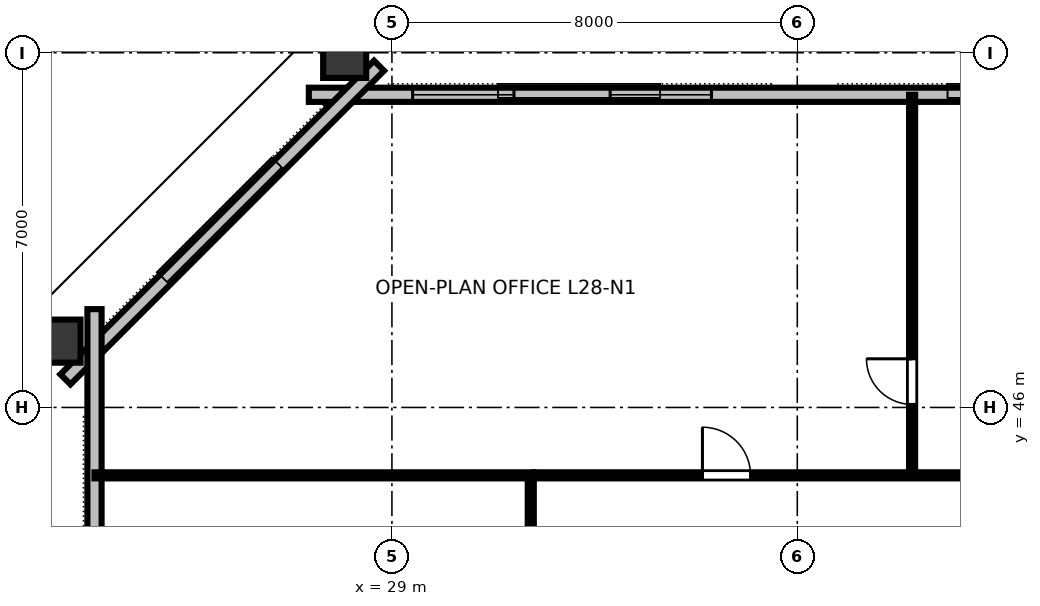
"""IFC4 building model, lengths in metres.
Left out: names, types, materials, properties, quantities, classifications, styles, units other than length and angle.
Written with IfcOpenShell. Run it as: python <this file> out.ifc"""

import sys

from ifc_helpers import new_model, si_unit, direction, frame, frame_2d, origin, origin_2d, place, context, subcontext, project, spatial, rectangle, hollow_rectangle, extrude, element, fill, save


model = new_model("IFC4")
c1 = context("Model", 3, precision=1e-05, world=origin(), true_north=direction((0.0, 1.0)))
c2 = subcontext(c1, "Body", "Model", "MODEL_VIEW")
j1 = project(units=[si_unit("LENGTHUNIT", "METRE"), si_unit("PLANEANGLEUNIT", "RADIAN")], contexts=[c1])
p1 = place(None, origin())
s1 = spatial("IfcSite", under=j1, at=p1, CompositionType="ELEMENT")
p2 = place(p1, origin())
s2 = spatial("IfcBuilding", under=s1, at=p2, CompositionType="ELEMENT")
p3 = place(p2, frame((0.0, 0.0, 109.6)))
s3 = spatial("IfcBuildingStorey", under=s2, at=p3, CompositionType="ELEMENT", Elevation=109.6)
for number, where, z_axis, x_axis in (
    (1, (28.067, 53.002, 0.0), (0.0, 0.0, 1.0), (1.0, 0.0, 0.0)),
    (2, (22.354, 47.309, 0.0), (0.0, 0.0, 1.0), (0.0, 1.0, 0.0)),
):
    element("IfcColumn", number, at=place(p3, frame(where, z_axis=z_axis, x_axis=x_axis)), inside=s3, PredefinedType="COLUMN", context=c2, shape_type="SweptSolid", body=[
        extrude(hollow_rectangle(XDim=0.85, YDim=1.0, WallThickness=0.05, at=origin_2d()), origin(), (0.0, 0.0, 1.0), 3.358),
    ])
p4 = place(p3, frame((64.64, 52.17, 0.0), z_axis=(0.0, 0.0, 1.0), x_axis=(-1.0, 0.0, 0.0)))
e3 = element("IfcWall", 3, at=p4, inside=s3, PredefinedType="STANDARD", context=c2, shape_type="SweptSolid", body=[
    extrude(rectangle(XDim=37.28, YDim=0.28, at=frame_2d((18.64, 0.0))), origin(), (0.0, 0.0, 1.0), 3.36),
])
p5 = place(p4, frame((15.347, 0.0, 0.0)))
e4 = element("IfcOpeningElement", 4, at=p5, cuts=e3, PredefinedType="OPENING", context=c2, shape_type="SweptSolid", body=[
    extrude(rectangle(XDim=1.4, YDim=2.15, at=frame_2d((0.7, 1.075))), frame((0.0, 0.15, 0.0), z_axis=(0.0, -1.0, 0.0), x_axis=(1.0, 0.0, 0.0)), (0.0, 0.0, 1.0), 0.3),
])
p6 = place(p4, frame((2.049, 0.0, 0.8)))
e5 = element("IfcOpeningElement", 5, at=p6, cuts=e3, PredefinedType="OPENING", context=c2, shape_type="SweptSolid", body=[
    extrude(rectangle(XDim=2.0, YDim=1.95, at=frame_2d((1.0, 0.975))), frame((0.0, 0.15, 0.0), z_axis=(0.0, -1.0, 0.0), x_axis=(1.0, 0.0, 0.0)), (0.0, 0.0, 1.0), 0.3),
])
p7 = place(p4, frame((5.947, 0.0, 0.8)))
e6 = element("IfcOpeningElement", 6, at=p7, cuts=e3, PredefinedType="OPENING", context=c2, shape_type="SweptSolid", body=[
    extrude(rectangle(XDim=2.0, YDim=1.95, at=frame_2d((1.0, 0.975))), frame((0.0, 0.15, 0.0), z_axis=(0.0, -1.0, 0.0), x_axis=(1.0, 0.0, 0.0)), (0.0, 0.0, 1.0), 0.3),
])
p8 = place(p4, frame((29.333, 0.0, 0.8)))
e7 = element("IfcOpeningElement", 7, at=p8, cuts=e3, PredefinedType="OPENING", context=c2, shape_type="SweptSolid", body=[
    extrude(rectangle(XDim=2.0, YDim=1.95, at=frame_2d((1.0, 0.975))), frame((0.0, 0.15, 0.0), z_axis=(0.0, -1.0, 0.0), x_axis=(1.0, 0.0, 0.0)), (0.0, 0.0, 1.0), 0.3),
])
p9 = place(p4, frame((33.231, 0.0, 0.8)))
e8 = element("IfcOpeningElement", 8, at=p9, cuts=e3, PredefinedType="OPENING", context=c2, shape_type="SweptSolid", body=[
    extrude(rectangle(XDim=2.0, YDim=1.95, at=frame_2d((1.0, 0.975))), frame((0.0, 0.15, 0.0), z_axis=(0.0, -1.0, 0.0), x_axis=(1.0, 0.0, 0.0)), (0.0, 0.0, 1.0), 0.3),
])
p10 = place(p3, frame((28.746, 52.744, 0.0), z_axis=(0.0, 0.0, 1.0), x_axis=(-0.707106781187, -0.707106781187, 0.0)))
e9 = element("IfcWall", 9, at=p10, inside=s3, PredefinedType="STANDARD", context=c2, shape_type="SweptSolid", body=[
    extrude(rectangle(XDim=8.753, YDim=0.28, at=frame_2d((4.376, 0.0))), origin(), (0.0, 0.0, 1.0), 3.36),
])
p11 = place(p3, frame((23.13, 47.94, 0.0), z_axis=(0.0, 0.0, 1.0), x_axis=(0.0, -1.0, 0.0)))
e10 = element("IfcWall", 10, at=p11, inside=s3, PredefinedType="STANDARD", context=c2, shape_type="SweptSolid", body=[
    extrude(rectangle(XDim=31.88, YDim=0.28, at=frame_2d((15.94, 0.0))), origin(), (0.0, 0.0, 1.0), 3.36),
])
p12 = place(p11, frame((5.665, 0.0, 0.8)))
e11 = element("IfcOpeningElement", 11, at=p12, cuts=e10, PredefinedType="OPENING", context=c2, shape_type="SweptSolid", body=[
    extrude(rectangle(XDim=2.0, YDim=1.95, at=frame_2d((1.0, 0.975))), frame((0.0, 0.15, 0.0), z_axis=(0.0, -1.0, 0.0), x_axis=(1.0, 0.0, 0.0)), (0.0, 0.0, 1.0), 0.3),
])
p13 = place(p11, frame((9.375, 0.0, 0.8)))
e12 = element("IfcOpeningElement", 12, at=p13, cuts=e10, PredefinedType="OPENING", context=c2, shape_type="SweptSolid", body=[
    extrude(rectangle(XDim=2.0, YDim=1.95, at=frame_2d((1.0, 0.975))), frame((0.0, 0.15, 0.0), z_axis=(0.0, -1.0, 0.0), x_axis=(1.0, 0.0, 0.0)), (0.0, 0.0, 1.0), 0.3),
])
p14 = place(p11, frame((20.505, 0.0, 0.8)))
e13 = element("IfcOpeningElement", 13, at=p14, cuts=e10, PredefinedType="OPENING", context=c2, shape_type="SweptSolid", body=[
    extrude(rectangle(XDim=2.0, YDim=1.95, at=frame_2d((1.0, 0.975))), frame((0.0, 0.15, 0.0), z_axis=(0.0, -1.0, 0.0), x_axis=(1.0, 0.0, 0.0)), (0.0, 0.0, 1.0), 0.3),
])
p15 = place(p11, frame((24.215, 0.0, 0.8)))
e14 = element("IfcOpeningElement", 14, at=p15, cuts=e10, PredefinedType="OPENING", context=c2, shape_type="SweptSolid", body=[
    extrude(rectangle(XDim=2.0, YDim=1.95, at=frame_2d((1.0, 0.975))), frame((0.0, 0.15, 0.0), z_axis=(0.0, -1.0, 0.0), x_axis=(1.0, 0.0, 0.0)), (0.0, 0.0, 1.0), 0.3),
])
p16 = place(p3, frame((39.266, 44.66, 0.0), z_axis=(0.0, 0.0, 1.0), x_axis=(0.0, 1.0, 0.0)))
e15 = element("IfcWall", 15, at=p16, inside=s3, PredefinedType="PARTITIONING", context=c2, shape_type="SweptSolid", body=[
    extrude(rectangle(XDim=7.51, YDim=0.12, at=frame_2d((3.755, 0.0))), origin(), (0.0, 0.0, 1.0), 2.64),
])
p17 = place(p16, frame((1.4, 0.0, 0.0)))
e16 = element("IfcOpeningElement", 16, at=p17, cuts=e15, PredefinedType="OPENING", context=c2, shape_type="SweptSolid", body=[
    extrude(rectangle(XDim=0.9, YDim=2.15, at=frame_2d((0.45, 1.075))), frame((0.0, 0.07, 0.0), z_axis=(0.0, -1.0, 0.0), x_axis=(1.0, 0.0, 0.0)), (0.0, 0.0, 1.0), 0.14),
])
p18 = place(p3, frame((31.8, 44.66, 0.0), z_axis=(0.0, 0.0, 1.0), x_axis=(1.0, 0.0, 0.0)))
e17 = element("IfcWall", 17, at=p18, inside=s3, PredefinedType="PARTITIONING", context=c2, shape_type="SweptSolid", body=[
    extrude(rectangle(XDim=28.4, YDim=0.12, at=frame_2d((14.2, 0.0))), origin(), (0.0, 0.0, 1.0), 2.64),
])
p19 = place(p18, frame((3.328, 0.0, 0.0)))
e18 = element("IfcOpeningElement", 18, at=p19, cuts=e17, PredefinedType="OPENING", context=c2, shape_type="SweptSolid", body=[
    extrude(rectangle(XDim=0.95, YDim=2.15, at=frame_2d((0.475, 1.075))), frame((0.0, 0.07, 0.0), z_axis=(0.0, -1.0, 0.0), x_axis=(1.0, 0.0, 0.0)), (0.0, 0.0, 1.0), 0.14),
])
p20 = place(p18, frame((8.901, 0.0, 0.0)))
e19 = element("IfcOpeningElement", 19, at=p20, cuts=e17, PredefinedType="OPENING", context=c2, shape_type="SweptSolid", body=[
    extrude(rectangle(XDim=0.95, YDim=2.15, at=frame_2d((0.475, 1.075))), frame((0.0, 0.07, 0.0), z_axis=(0.0, -1.0, 0.0), x_axis=(1.0, 0.0, 0.0)), (0.0, 0.0, 1.0), 0.14),
])
p21 = place(p18, frame((14.127, 0.0, 0.0)))
e20 = element("IfcOpeningElement", 20, at=p21, cuts=e17, PredefinedType="OPENING", context=c2, shape_type="SweptSolid", body=[
    extrude(rectangle(XDim=0.95, YDim=2.15, at=frame_2d((0.475, 1.075))), frame((0.0, 0.07, 0.0), z_axis=(0.0, -1.0, 0.0), x_axis=(1.0, 0.0, 0.0)), (0.0, 0.0, 1.0), 0.14),
])
p22 = place(p18, frame((19.537, 0.0, 0.0)))
e21 = element("IfcOpeningElement", 21, at=p22, cuts=e17, PredefinedType="OPENING", context=c2, shape_type="SweptSolid", body=[
    extrude(rectangle(XDim=0.95, YDim=2.15, at=frame_2d((0.475, 1.075))), frame((0.0, 0.07, 0.0), z_axis=(0.0, -1.0, 0.0), x_axis=(1.0, 0.0, 0.0)), (0.0, 0.0, 1.0), 0.14),
])
p23 = place(p18, frame((24.708, 0.0, 0.0)))
e22 = element("IfcOpeningElement", 22, at=p23, cuts=e17, PredefinedType="OPENING", context=c2, shape_type="SweptSolid", body=[
    extrude(rectangle(XDim=0.95, YDim=2.15, at=frame_2d((0.475, 1.075))), frame((0.0, 0.07, 0.0), z_axis=(0.0, -1.0, 0.0), x_axis=(1.0, 0.0, 0.0)), (0.0, 0.0, 1.0), 0.14),
])
p24 = place(p3, frame((31.74, 33.02, 0.0), z_axis=(0.0, 0.0, 1.0), x_axis=(0.0, 1.0, 0.0)))
e23 = element("IfcWall", 23, at=p24, inside=s3, PredefinedType="PARTITIONING", context=c2, shape_type="SweptSolid", body=[
    extrude(rectangle(XDim=11.58, YDim=0.12, at=frame_2d((5.79, 0.0))), origin(), (0.0, 0.0, 1.0), 2.64),
])
p25 = place(p24, frame((5.215, 0.0, 0.0)))
e24 = element("IfcOpeningElement", 24, at=p25, cuts=e23, PredefinedType="OPENING", context=c2, shape_type="SweptSolid", body=[
    extrude(rectangle(XDim=0.95, YDim=2.15, at=frame_2d((0.475, 1.075))), frame((0.0, 0.07, 0.0), z_axis=(0.0, -1.0, 0.0), x_axis=(1.0, 0.0, 0.0)), (0.0, 0.0, 1.0), 0.14),
])
p26 = place(p3, frame((31.8, 44.66, 0.0), z_axis=(0.0, 0.0, 1.0), x_axis=(-1.0, 0.0, 0.0)))
e25 = element("IfcWall", 25, at=p26, inside=s3, PredefinedType="PARTITIONING", context=c2, shape_type="SweptSolid", body=[
    extrude(rectangle(XDim=8.67, YDim=0.12, at=frame_2d((4.335, 0.0))), origin(), (0.0, 0.0, 1.0), 2.64),
])
p27 = place(p8, origin())
e26 = element("IfcWindow", 26, at=p27, inside=s3, PartitioningType="SINGLE_PANEL", PredefinedType="WINDOW", context=c2, shape_type="SweptSolid", body=[
    extrude(rectangle(XDim=2.0, YDim=1.95, at=frame_2d((1.0, 0.975))), frame((0.0, 0.03, 0.0), z_axis=(0.0, -1.0, 0.0), x_axis=(1.0, 0.0, 0.0)), (0.0, 0.0, 1.0), 0.06),
])
fill(e7, e26)
p28 = place(p9, origin())
e27 = element("IfcWindow", 27, at=p28, inside=s3, PartitioningType="SINGLE_PANEL", PredefinedType="WINDOW", context=c2, shape_type="SweptSolid", body=[
    extrude(rectangle(XDim=2.0, YDim=1.95, at=frame_2d((1.0, 0.975))), frame((0.0, 0.03, 0.0), z_axis=(0.0, -1.0, 0.0), x_axis=(1.0, 0.0, 0.0)), (0.0, 0.0, 1.0), 0.06),
])
fill(e8, e27)
p29 = place(p17, origin())
e28 = element("IfcDoor", 28, at=p29, inside=s3, OperationType="SINGLE_SWING_RIGHT", PredefinedType="DOOR", context=c2, shape_type="SweptSolid", body=[
    extrude(rectangle(XDim=0.9, YDim=2.15, at=frame_2d((0.45, 1.075))), frame((0.0, 0.025, 0.0), z_axis=(0.0, -1.0, 0.0), x_axis=(1.0, 0.0, 0.0)), (0.0, 0.0, 1.0), 0.05),
])
fill(e16, e28)
p30 = place(p19, origin())
e29 = element("IfcDoor", 29, at=p30, inside=s3, OperationType="SINGLE_SWING_LEFT", PredefinedType="DOOR", context=c2, shape_type="SweptSolid", body=[
    extrude(rectangle(XDim=0.95, YDim=2.15, at=frame_2d((0.475, 1.075))), frame((0.0, 0.025, 0.0), z_axis=(0.0, -1.0, 0.0), x_axis=(1.0, 0.0, 0.0)), (0.0, 0.0, 1.0), 0.05),
])
fill(e18, e29)
save(model, sys.argv[1])
